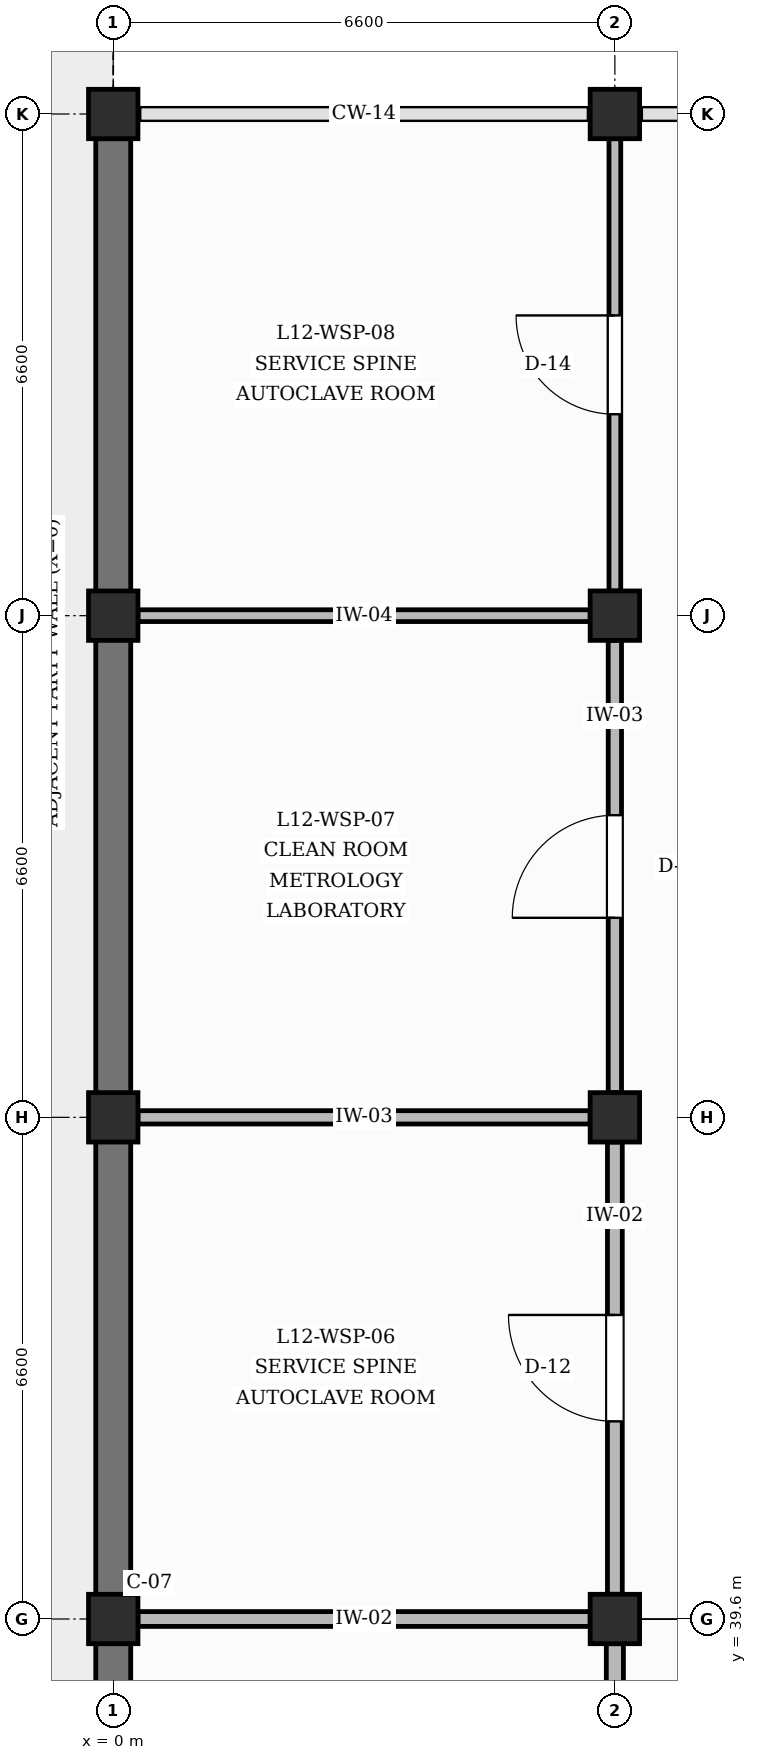
"""IFC4 building model, lengths in metres.
Left out: names, types, materials, properties, quantities, classifications, styles, units other than length and angle.
Written with IfcOpenShell. Run it as: python <this file> out.ifc"""

import sys

from ifc_helpers import new_model, si_unit, direction, frame, frame_2d, origin, origin_2d, place, context, subcontext, project, spatial, rectangle, extrude, element, fill, save


model = new_model("IFC4")
c1 = context("Model", 3, precision=1e-05, world=origin(), true_north=direction((0.0, 1.0)))
c2 = subcontext(c1, "Body", "Model", "MODEL_VIEW")
j1 = project(units=[si_unit("LENGTHUNIT", "METRE"), si_unit("PLANEANGLEUNIT", "RADIAN")], contexts=[c1])
p1 = place(None, origin())
s1 = spatial("IfcSite", under=j1, at=p1, CompositionType="ELEMENT")
p2 = place(p1, origin())
s2 = spatial("IfcBuilding", under=s1, at=p2, CompositionType="ELEMENT")
p3 = place(p2, frame((0.0, 0.0, 52.2)))
s3 = spatial("IfcBuildingStorey", under=s2, at=p3, CompositionType="ELEMENT", Elevation=52.2)
for number, where, z_axis, x_axis in (
    (1, (0.0, 39.6, 0.0), (0.0, 0.0, 1.0), (1.0, 0.0, 0.0)),
    (2, (0.0, 46.2, 0.0), (0.0, 0.0, 1.0), (1.0, 0.0, 0.0)),
    (3, (0.0, 52.8, 0.0), (0.0, 0.0, 1.0), (1.0, 0.0, 0.0)),
    (4, (0.0, 59.4, 0.0), (0.0, 0.0, 1.0), (1.0, 0.0, 0.0)),
    (5, (6.6, 39.6, 0.0), (0.0, 0.0, 1.0), (1.0, 0.0, 0.0)),
    (6, (6.6, 46.2, 0.0), (0.0, 0.0, 1.0), (1.0, 0.0, 0.0)),
    (7, (6.6, 52.8, 0.0), (0.0, 0.0, 1.0), (1.0, 0.0, 0.0)),
    (8, (6.6, 59.4, 0.0), (0.0, 0.0, 1.0), (1.0, 0.0, 0.0)),
):
    element("IfcColumn", number, at=place(p3, frame(where, z_axis=z_axis, x_axis=x_axis)), inside=s3, PredefinedType="COLUMN", context=c2, shape_type="SweptSolid", body=[
        extrude(rectangle(XDim=0.65, YDim=0.65, at=origin_2d()), origin(), (0.0, 0.0, 1.0), 4.2),
    ])
for number, where, z_axis, x_axis in (
    (9, (0.0, 33.325, 0.0), (0.0, 0.0, 1.0), (0.0, 1.0, 0.0)),
    (10, (0.0, 39.925, 0.0), (0.0, 0.0, 1.0), (0.0, 1.0, 0.0)),
):
    element("IfcWall", number, at=place(p3, frame(where, z_axis=z_axis, x_axis=x_axis)), inside=s3, PredefinedType="SOLIDWALL", context=c2, shape_type="SweptSolid", body=[
        extrude(rectangle(XDim=5.95, YDim=0.46, at=frame_2d((2.975, 0.0))), origin(), (0.0, 0.0, 1.0), 3.3),
    ])
p4 = place(p3, frame((0.0, 46.525, 0.0), z_axis=(0.0, 0.0, 1.0), x_axis=(0.0, 1.0, 0.0)))
e11 = element("IfcWall", 11, at=p4, inside=s3, PredefinedType="SOLIDWALL", context=c2, shape_type="SweptSolid", body=[
    extrude(rectangle(XDim=5.95, YDim=0.46, at=frame_2d((2.975, 0.0))), origin(), (0.0, 0.0, 1.0), 3.3),
])
p5 = place(p3, frame((0.0, 53.125, 0.0), z_axis=(0.0, 0.0, 1.0), x_axis=(0.0, 1.0, 0.0)))
e12 = element("IfcWall", 12, at=p5, inside=s3, PredefinedType="SOLIDWALL", context=c2, shape_type="SweptSolid", body=[
    extrude(rectangle(XDim=5.95, YDim=0.46, at=frame_2d((2.975, 0.0))), origin(), (0.0, 0.0, 1.0), 3.3),
])
p6 = place(p3, frame((6.6, 33.325, 0.0), z_axis=(0.0, 0.0, 1.0), x_axis=(0.0, 1.0, 0.0)))
e13 = element("IfcWall", 13, at=p6, inside=s3, PredefinedType="PARTITIONING", context=c2, shape_type="SweptSolid", body=[
    extrude(rectangle(XDim=5.95, YDim=0.225, at=frame_2d((2.975, 0.0))), origin(), (0.0, 0.0, 1.0), 3.3),
])
p7 = place(p6, frame((2.25, 0.0, 0.0)))
e14 = element("IfcOpeningElement", 14, at=p7, cuts=e13, PredefinedType="OPENING", context=c2, shape_type="SweptSolid", body=[
    extrude(rectangle(XDim=1.45, YDim=2.25, at=frame_2d((0.725, 1.125))), frame((0.0, 0.123, 0.0), z_axis=(0.0, -1.0, 0.0), x_axis=(1.0, 0.0, 0.0)), (0.0, 0.0, 1.0), 0.245),
])
p8 = place(p3, frame((0.325, 39.6, 0.0), z_axis=(0.0, 0.0, 1.0), x_axis=(1.0, 0.0, 0.0)))
e15 = element("IfcWall", 15, at=p8, inside=s3, PredefinedType="PARTITIONING", context=c2, shape_type="SweptSolid", body=[
    extrude(rectangle(XDim=5.95, YDim=0.195, at=frame_2d((2.975, 0.0))), origin(), (0.0, 0.0, 1.0), 3.3),
])
p9 = place(p3, frame((6.6, 39.925, 0.0), z_axis=(0.0, 0.0, 1.0), x_axis=(0.0, 1.0, 0.0)))
e16 = element("IfcWall", 16, at=p9, inside=s3, PredefinedType="PARTITIONING", context=c2, shape_type="SweptSolid", body=[
    extrude(rectangle(XDim=5.95, YDim=0.195, at=frame_2d((2.975, 0.0))), origin(), (0.0, 0.0, 1.0), 3.3),
])
p10 = place(p9, frame((2.275, 0.0, 0.0)))
e17 = element("IfcOpeningElement", 17, at=p10, cuts=e16, PredefinedType="OPENING", context=c2, shape_type="SweptSolid", body=[
    extrude(rectangle(XDim=1.4, YDim=2.25, at=frame_2d((0.7, 1.125))), frame((0.0, 0.107, 0.0), z_axis=(0.0, -1.0, 0.0), x_axis=(1.0, 0.0, 0.0)), (0.0, 0.0, 1.0), 0.215),
])
p11 = place(p3, frame((0.325, 46.2, 0.0), z_axis=(0.0, 0.0, 1.0), x_axis=(1.0, 0.0, 0.0)))
e18 = element("IfcWall", 18, at=p11, inside=s3, PredefinedType="PARTITIONING", context=c2, shape_type="SweptSolid", body=[
    extrude(rectangle(XDim=5.95, YDim=0.175, at=frame_2d((2.975, 0.0))), origin(), (0.0, 0.0, 1.0), 3.3),
])
p12 = place(p3, frame((6.6, 46.525, 0.0), z_axis=(0.0, 0.0, 1.0), x_axis=(0.0, 1.0, 0.0)))
e19 = element("IfcWall", 19, at=p12, inside=s3, PredefinedType="PARTITIONING", context=c2, shape_type="SweptSolid", body=[
    extrude(rectangle(XDim=5.95, YDim=0.175, at=frame_2d((2.975, 0.0))), origin(), (0.0, 0.0, 1.0), 3.3),
])
p13 = place(p12, frame((2.3, 0.0, 0.0)))
e20 = element("IfcOpeningElement", 20, at=p13, cuts=e19, PredefinedType="OPENING", context=c2, shape_type="SweptSolid", body=[
    extrude(rectangle(XDim=1.35, YDim=2.3, at=frame_2d((0.675, 1.15))), frame((0.0, 0.097, 0.0), z_axis=(0.0, -1.0, 0.0), x_axis=(1.0, 0.0, 0.0)), (0.0, 0.0, 1.0), 0.195),
])
p14 = place(p3, frame((0.325, 52.8, 0.0), z_axis=(0.0, 0.0, 1.0), x_axis=(1.0, 0.0, 0.0)))
e21 = element("IfcWall", 21, at=p14, inside=s3, PredefinedType="PARTITIONING", context=c2, shape_type="SweptSolid", body=[
    extrude(rectangle(XDim=5.95, YDim=0.155, at=frame_2d((2.975, 0.0))), origin(), (0.0, 0.0, 1.0), 3.3),
])
p15 = place(p3, frame((6.6, 53.125, 0.0), z_axis=(0.0, 0.0, 1.0), x_axis=(0.0, 1.0, 0.0)))
e22 = element("IfcWall", 22, at=p15, inside=s3, PredefinedType="PARTITIONING", context=c2, shape_type="SweptSolid", body=[
    extrude(rectangle(XDim=5.95, YDim=0.155, at=frame_2d((2.975, 0.0))), origin(), (0.0, 0.0, 1.0), 3.3),
])
p16 = place(p15, frame((2.325, 0.0, 0.0)))
e23 = element("IfcOpeningElement", 23, at=p16, cuts=e22, PredefinedType="OPENING", context=c2, shape_type="SweptSolid", body=[
    extrude(rectangle(XDim=1.3, YDim=2.3, at=frame_2d((0.65, 1.15))), frame((0.0, 0.087, 0.0), z_axis=(0.0, -1.0, 0.0), x_axis=(1.0, 0.0, 0.0)), (0.0, 0.0, 1.0), 0.175),
])
p17 = place(p10, origin())
e24 = element("IfcDoor", 24, at=p17, inside=s3, OperationType="SINGLE_SWING_RIGHT", PredefinedType="DOOR", context=c2, shape_type="SweptSolid", body=[
    extrude(rectangle(XDim=1.4, YDim=2.25, at=frame_2d((0.7, 1.125))), frame((0.0, 0.025, 0.0), z_axis=(0.0, -1.0, 0.0), x_axis=(1.0, 0.0, 0.0)), (0.0, 0.0, 1.0), 0.05),
])
fill(e17, e24)
p18 = place(p13, origin())
e25 = element("IfcDoor", 25, at=p18, inside=s3, OperationType="SINGLE_SWING_LEFT", PredefinedType="DOOR", context=c2, shape_type="SweptSolid", body=[
    extrude(rectangle(XDim=1.35, YDim=2.3, at=frame_2d((0.675, 1.15))), frame((0.0, 0.025, 0.0), z_axis=(0.0, -1.0, 0.0), x_axis=(1.0, 0.0, 0.0)), (0.0, 0.0, 1.0), 0.05),
])
fill(e20, e25)
p19 = place(p16, origin())
e26 = element("IfcDoor", 26, at=p19, inside=s3, OperationType="SINGLE_SWING_RIGHT", PredefinedType="DOOR", context=c2, shape_type="SweptSolid", body=[
    extrude(rectangle(XDim=1.3, YDim=2.3, at=frame_2d((0.65, 1.15))), frame((0.0, 0.025, 0.0), z_axis=(0.0, -1.0, 0.0), x_axis=(1.0, 0.0, 0.0)), (0.0, 0.0, 1.0), 0.05),
])
fill(e23, e26)
save(model, sys.argv[1])
